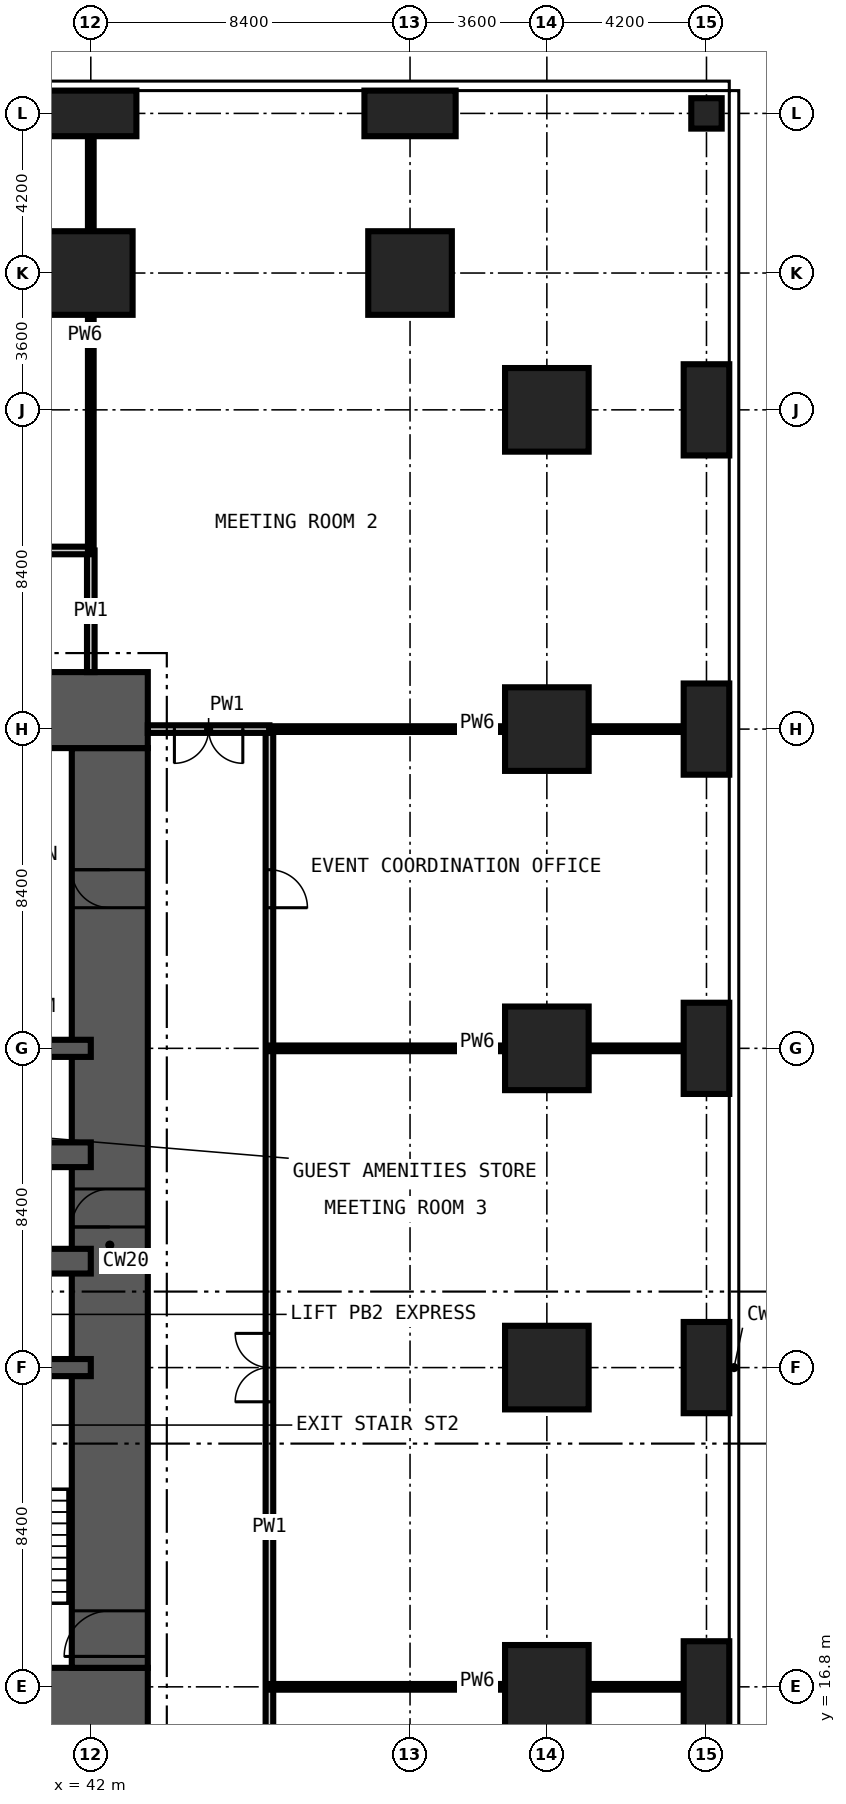
"""IFC4 building model, lengths in metres.
Left out: names, types, materials, properties, quantities, classifications, styles, units other than length and angle.
Written with IfcOpenShell. Run it as: python <this file> out.ifc"""

import sys

from ifc_helpers import new_model, si_unit, direction, frame, frame_2d, origin, origin_2d, place, context, subcontext, project, spatial, rectangle, extrude, element, fill, save


model = new_model("IFC4")
c1 = context("Model", 3, precision=1e-05, world=origin(), true_north=direction((0.0, 1.0)))
c2 = subcontext(c1, "Body", "Model", "MODEL_VIEW")
j1 = project(units=[si_unit("LENGTHUNIT", "METRE"), si_unit("PLANEANGLEUNIT", "RADIAN")], contexts=[c1])
p1 = place(None, origin())
s1 = spatial("IfcSite", under=j1, at=p1, CompositionType="ELEMENT")
p2 = place(p1, origin())
s2 = spatial("IfcBuilding", under=s1, at=p2, CompositionType="ELEMENT")
p3 = place(p2, frame((0.0, 0.0, 6.0)))
s3 = spatial("IfcBuildingStorey", under=s2, at=p3, CompositionType="ELEMENT", Elevation=6.0)
p4 = place(p3, frame((42.0, 54.0, -0.3), z_axis=(0.0, 0.0, 1.0), x_axis=(1.0, 0.0, 0.0)))
e1 = element("IfcColumn", 1, at=p4, inside=s3, PredefinedType="COLUMN", context=c2, shape_type="SweptSolid", body=[
    extrude(rectangle(XDim=2.2, YDim=2.2, at=origin_2d()), origin(), (0.0, 0.0, 1.0), 6.0),
])
p5 = place(p3, frame((42.0, 58.2, -0.3), z_axis=(0.0, 0.0, 1.0), x_axis=(1.0, 0.0, 0.0)))
e2 = element("IfcColumn", 2, at=p5, inside=s3, PredefinedType="COLUMN", context=c2, shape_type="SweptSolid", body=[
    extrude(rectangle(XDim=2.4, YDim=1.2, at=origin_2d()), origin(), (0.0, 0.0, 1.0), 6.0),
])
p6 = place(p3, frame((50.4, 54.0, -0.3), z_axis=(0.0, 0.0, 1.0), x_axis=(1.0, 0.0, 0.0)))
e3 = element("IfcColumn", 3, at=p6, inside=s3, PredefinedType="COLUMN", context=c2, shape_type="SweptSolid", body=[
    extrude(rectangle(XDim=2.2, YDim=2.2, at=origin_2d()), origin(), (0.0, 0.0, 1.0), 6.0),
])
p7 = place(p3, frame((50.4, 58.2, -0.3), z_axis=(0.0, 0.0, 1.0), x_axis=(1.0, 0.0, 0.0)))
e4 = element("IfcColumn", 4, at=p7, inside=s3, PredefinedType="COLUMN", context=c2, shape_type="SweptSolid", body=[
    extrude(rectangle(XDim=2.4, YDim=1.2, at=origin_2d()), origin(), (0.0, 0.0, 1.0), 6.0),
])
for number, where, z_axis, x_axis in (
    (5, (54.0, 16.8, -0.3), (0.0, 0.0, 1.0), (1.0, 0.0, 0.0)),
    (6, (54.0, 25.2, -0.3), (0.0, 0.0, 1.0), (1.0, 0.0, 0.0)),
    (7, (54.0, 33.6, -0.3), (0.0, 0.0, 1.0), (1.0, 0.0, 0.0)),
    (8, (54.0, 42.0, -0.3), (0.0, 0.0, 1.0), (1.0, 0.0, 0.0)),
    (9, (54.0, 50.4, -0.3), (0.0, 0.0, 1.0), (1.0, 0.0, 0.0)),
):
    element("IfcColumn", number, at=place(p3, frame(where, z_axis=z_axis, x_axis=x_axis)), inside=s3, PredefinedType="COLUMN", context=c2, shape_type="SweptSolid", body=[
        extrude(rectangle(XDim=2.2, YDim=2.2, at=origin_2d()), origin(), (0.0, 0.0, 1.0), 6.0),
    ])
for number, where, z_axis, x_axis in (
    (10, (58.2, 16.8, -0.3), (0.0, 0.0, 1.0), (1.0, 0.0, 0.0)),
    (11, (58.2, 25.2, -0.3), (0.0, 0.0, 1.0), (1.0, 0.0, 0.0)),
    (12, (58.2, 33.6, -0.3), (0.0, 0.0, 1.0), (1.0, 0.0, 0.0)),
    (13, (58.2, 42.0, -0.3), (0.0, 0.0, 1.0), (1.0, 0.0, 0.0)),
    (14, (58.2, 50.4, -0.3), (0.0, 0.0, 1.0), (1.0, 0.0, 0.0)),
):
    element("IfcColumn", number, at=place(p3, frame(where, z_axis=z_axis, x_axis=x_axis)), inside=s3, PredefinedType="COLUMN", context=c2, shape_type="SweptSolid", body=[
        extrude(rectangle(XDim=1.2, YDim=2.4, at=origin_2d()), origin(), (0.0, 0.0, 1.0), 6.0),
    ])
p8 = place(p3, frame((58.2, 58.2, -0.3), z_axis=(0.0, 0.0, 1.0), x_axis=(1.0, 0.0, 0.0)))
e15 = element("IfcColumn", 15, at=p8, inside=s3, PredefinedType="COLUMN", context=c2, shape_type="SweptSolid", body=[
    extrude(rectangle(XDim=0.8, YDim=0.8, at=origin_2d()), origin(), (0.0, 0.0, 1.0), 6.0),
])
p9 = place(p3, frame((15.3, 16.3, -0.3), z_axis=(0.0, 0.0, 1.0), x_axis=(1.0, 0.0, 0.0)))
e16 = element("IfcWall", 16, at=p9, inside=s3, PredefinedType="SHEAR", context=c2, shape_type="SweptSolid", body=[
    extrude(rectangle(XDim=28.2, YDim=2.0, at=frame_2d((14.1, 0.0))), origin(), (0.0, 0.0, 1.0), 6.0),
])
p10 = place(p9, frame((13.6, 0.0, 0.3)))
e17 = element("IfcOpeningElement", 17, at=p10, cuts=e16, PredefinedType="OPENING", context=c2, shape_type="SweptSolid", body=[
    extrude(rectangle(XDim=1.0, YDim=2.1, at=frame_2d((0.5, 1.05))), frame((0.0, 1.01, 0.0), z_axis=(0.0, -1.0, 0.0), x_axis=(1.0, 0.0, 0.0)), (0.0, 0.0, 1.0), 2.02),
])
p11 = place(p9, frame((19.9, 0.0, 0.3)))
e18 = element("IfcOpeningElement", 18, at=p11, cuts=e16, PredefinedType="OPENING", context=c2, shape_type="SweptSolid", body=[
    extrude(rectangle(XDim=1.0, YDim=2.1, at=frame_2d((0.5, 1.05))), frame((0.0, 1.01, 0.0), z_axis=(0.0, -1.0, 0.0), x_axis=(1.0, 0.0, 0.0)), (0.0, 0.0, 1.0), 2.02),
])
p12 = place(p3, frame((42.5, 17.3, -0.3), z_axis=(0.0, 0.0, 1.0), x_axis=(0.0, 1.0, 0.0)))
e19 = element("IfcWall", 19, at=p12, inside=s3, PredefinedType="SHEAR", context=c2, shape_type="SweptSolid", body=[
    extrude(rectangle(XDim=24.2, YDim=2.0, at=frame_2d((12.1, 0.0))), origin(), (0.0, 0.0, 1.0), 6.0),
])
p13 = place(p12, frame((0.3, 0.0, 0.3)))
e20 = element("IfcOpeningElement", 20, at=p13, cuts=e19, PredefinedType="OPENING", context=c2, shape_type="SweptSolid", body=[
    extrude(rectangle(XDim=1.2, YDim=2.2, at=frame_2d((0.6, 1.1))), frame((0.0, 1.01, 0.0), z_axis=(0.0, -1.0, 0.0), x_axis=(1.0, 0.0, 0.0)), (0.0, 0.0, 1.0), 2.02),
])
p14 = place(p12, frame((11.6, 0.0, 0.3)))
e21 = element("IfcOpeningElement", 21, at=p14, cuts=e19, PredefinedType="OPENING", context=c2, shape_type="SweptSolid", body=[
    extrude(rectangle(XDim=1.0, YDim=2.1, at=frame_2d((0.5, 1.05))), frame((0.0, 1.01, 0.0), z_axis=(0.0, -1.0, 0.0), x_axis=(1.0, 0.0, 0.0)), (0.0, 0.0, 1.0), 2.02),
])
p15 = place(p12, frame((20.0, 0.0, 0.3)))
e22 = element("IfcOpeningElement", 22, at=p15, cuts=e19, PredefinedType="OPENING", context=c2, shape_type="SweptSolid", body=[
    extrude(rectangle(XDim=1.0, YDim=2.1, at=frame_2d((0.5, 1.05))), frame((0.0, 1.01, 0.0), z_axis=(0.0, -1.0, 0.0), x_axis=(1.0, 0.0, 0.0)), (0.0, 0.0, 1.0), 2.02),
])
p16 = place(p3, frame((43.5, 42.5, -0.3), z_axis=(0.0, 0.0, 1.0), x_axis=(-1.0, 0.0, 0.0)))
e23 = element("IfcWall", 23, at=p16, inside=s3, PredefinedType="SHEAR", context=c2, shape_type="SweptSolid", body=[
    extrude(rectangle(XDim=28.2, YDim=2.0, at=frame_2d((14.1, 0.0))), origin(), (0.0, 0.0, 1.0), 6.0),
])
p17 = place(p16, frame((21.4, 0.0, 0.3)))
e24 = element("IfcOpeningElement", 24, at=p17, cuts=e23, PredefinedType="OPENING", context=c2, shape_type="SweptSolid", body=[
    extrude(rectangle(XDim=1.0, YDim=2.1, at=frame_2d((0.5, 1.05))), frame((0.0, 1.01, 0.0), z_axis=(0.0, -1.0, 0.0), x_axis=(1.0, 0.0, 0.0)), (0.0, 0.0, 1.0), 2.02),
])
p18 = place(p16, frame((11.4, 0.0, 0.3)))
e25 = element("IfcOpeningElement", 25, at=p18, cuts=e23, PredefinedType="OPENING", context=c2, shape_type="SweptSolid", body=[
    extrude(rectangle(XDim=1.2, YDim=2.2, at=frame_2d((0.6, 1.1))), frame((0.0, 1.01, 0.0), z_axis=(0.0, -1.0, 0.0), x_axis=(1.0, 0.0, 0.0)), (0.0, 0.0, 1.0), 2.02),
])
for number, where, z_axis, x_axis in (
    (26, (16.8, 25.2, -0.3), (0.0, 0.0, 1.0), (1.0, 0.0, 0.0)),
    (27, (16.8, 33.6, -0.3), (0.0, 0.0, 1.0), (1.0, 0.0, 0.0)),
):
    element("IfcWall", number, at=place(p3, frame(where, z_axis=z_axis, x_axis=x_axis)), inside=s3, PredefinedType="SHEAR", context=c2, shape_type="SweptSolid", body=[
        extrude(rectangle(XDim=25.2, YDim=0.45, at=frame_2d((12.6, 0.0))), origin(), (0.0, 0.0, 1.0), 6.0),
    ])
p19 = place(p3, frame((33.6, 28.0, -0.3), z_axis=(0.0, 0.0, 1.0), x_axis=(1.0, 0.0, 0.0)))
e28 = element("IfcWall", 28, at=p19, inside=s3, PredefinedType="SHEAR", context=c2, shape_type="SweptSolid", body=[
    extrude(rectangle(XDim=8.4, YDim=0.65, at=frame_2d((4.2, 0.0))), origin(), (0.0, 0.0, 1.0), 6.0),
])
p20 = place(p3, frame((33.6, 30.8, -0.3), z_axis=(0.0, 0.0, 1.0), x_axis=(1.0, 0.0, 0.0)))
e29 = element("IfcWall", 29, at=p20, inside=s3, PredefinedType="SHEAR", context=c2, shape_type="SweptSolid", body=[
    extrude(rectangle(XDim=8.4, YDim=0.65, at=frame_2d((4.2, 0.0))), origin(), (0.0, 0.0, 1.0), 6.0),
])
p21 = place(p20, frame((1.6, 0.0, 0.3)))
e30 = element("IfcOpeningElement", 30, at=p21, cuts=e29, PredefinedType="OPENING", context=c2, shape_type="SweptSolid", body=[
    extrude(rectangle(XDim=1.0, YDim=2.1, at=frame_2d((0.5, 1.05))), frame((0.0, 0.335, 0.0), z_axis=(0.0, -1.0, 0.0), x_axis=(1.0, 0.0, 0.0)), (0.0, 0.0, 1.0), 0.67),
])
p22 = place(p20, frame((4.6, 0.0, 0.3)))
e31 = element("IfcOpeningElement", 31, at=p22, cuts=e29, PredefinedType="OPENING", context=c2, shape_type="SweptSolid", body=[
    extrude(rectangle(XDim=1.0, YDim=2.1, at=frame_2d((0.5, 1.05))), frame((0.0, 0.335, 0.0), z_axis=(0.0, -1.0, 0.0), x_axis=(1.0, 0.0, 0.0)), (0.0, 0.0, 1.0), 0.67),
])
p23 = place(p3, frame((42.0, 43.5, 0.0), z_axis=(0.0, 0.0, 1.0), x_axis=(0.0, 1.0, 0.0)))
e32 = element("IfcWall", 32, at=p23, inside=s3, PredefinedType="PARTITIONING", context=c2, shape_type="SweptSolid", body=[
    extrude(rectangle(XDim=3.2, YDim=0.2, at=frame_2d((1.6, 0.0))), origin(), (0.0, 0.0, 1.0), 5.7),
])
p24 = place(p3, frame((46.7, 0.0, 0.0), z_axis=(0.0, 0.0, 1.0), x_axis=(0.0, 1.0, 0.0)))
e33 = element("IfcWall", 33, at=p24, inside=s3, PredefinedType="PARTITIONING", context=c2, shape_type="SweptSolid", body=[
    extrude(rectangle(XDim=42.0, YDim=0.2, at=frame_2d((21.0, 0.0))), origin(), (0.0, 0.0, 1.0), 5.7),
])
p25 = place(p24, frame((24.3, 0.0, 0.0)))
e34 = element("IfcOpeningElement", 34, at=p25, cuts=e33, PredefinedType="OPENING", context=c2, shape_type="SweptSolid", body=[
    extrude(rectangle(XDim=1.8, YDim=2.4, at=frame_2d((0.9, 1.2))), frame((0.0, 0.11, 0.0), z_axis=(0.0, -1.0, 0.0), x_axis=(1.0, 0.0, 0.0)), (0.0, 0.0, 1.0), 0.22),
])
p26 = place(p24, frame((7.9, 0.0, 0.0)))
e35 = element("IfcOpeningElement", 35, at=p26, cuts=e33, PredefinedType="OPENING", context=c2, shape_type="SweptSolid", body=[
    extrude(rectangle(XDim=1.0, YDim=2.1, at=frame_2d((0.5, 1.05))), frame((0.0, 0.11, 0.0), z_axis=(0.0, -1.0, 0.0), x_axis=(1.0, 0.0, 0.0)), (0.0, 0.0, 1.0), 0.22),
])
p27 = place(p24, frame((37.3, 0.0, 0.0)))
e36 = element("IfcOpeningElement", 36, at=p27, cuts=e33, PredefinedType="OPENING", context=c2, shape_type="SweptSolid", body=[
    extrude(rectangle(XDim=1.0, YDim=2.1, at=frame_2d((0.5, 1.05))), frame((0.0, 0.11, 0.0), z_axis=(0.0, -1.0, 0.0), x_axis=(1.0, 0.0, 0.0)), (0.0, 0.0, 1.0), 0.22),
])
p28 = place(p3, frame((33.6, 46.7, 0.0), z_axis=(0.0, 0.0, 1.0), x_axis=(1.0, 0.0, 0.0)))
e37 = element("IfcWall", 37, at=p28, inside=s3, PredefinedType="PARTITIONING", context=c2, shape_type="SweptSolid", body=[
    extrude(rectangle(XDim=8.4, YDim=0.2, at=frame_2d((4.2, 0.0))), origin(), (0.0, 0.0, 1.0), 5.7),
])
p29 = place(p28, frame((3.7, 0.0, 0.0)))
e38 = element("IfcOpeningElement", 38, at=p29, cuts=e37, PredefinedType="OPENING", context=c2, shape_type="SweptSolid", body=[
    extrude(rectangle(XDim=1.0, YDim=2.1, at=frame_2d((0.5, 1.05))), frame((0.0, 0.11, 0.0), z_axis=(0.0, -1.0, 0.0), x_axis=(1.0, 0.0, 0.0)), (0.0, 0.0, 1.0), 0.22),
])
p30 = place(p3, frame((46.7, 42.0, 0.0), z_axis=(0.0, 0.0, 1.0), x_axis=(-1.0, 0.0, 0.0)))
e39 = element("IfcWall", 39, at=p30, inside=s3, PredefinedType="PARTITIONING", context=c2, shape_type="SweptSolid", body=[
    extrude(rectangle(XDim=3.2, YDim=0.2, at=frame_2d((1.6, 0.0))), origin(), (0.0, 0.0, 1.0), 5.7),
])
p31 = place(p30, frame((0.7, 0.0, 0.0)))
e40 = element("IfcOpeningElement", 40, at=p31, cuts=e39, PredefinedType="OPENING", context=c2, shape_type="SweptSolid", body=[
    extrude(rectangle(XDim=1.8, YDim=2.4, at=frame_2d((0.9, 1.2))), frame((0.0, 0.11, 0.0), z_axis=(0.0, -1.0, 0.0), x_axis=(1.0, 0.0, 0.0)), (0.0, 0.0, 1.0), 0.22),
])
for number, where, z_axis, x_axis in (
    (41, (42.0, 46.7, 0.0), (0.0, 0.0, 1.0), (0.0, 1.0, 0.0)),
    (42, (46.7, 16.8, 0.0), (0.0, 0.0, 1.0), (1.0, 0.0, 0.0)),
    (43, (46.7, 33.6, 0.0), (0.0, 0.0, 1.0), (1.0, 0.0, 0.0)),
    (44, (46.7, 42.0, 0.0), (0.0, 0.0, 1.0), (1.0, 0.0, 0.0)),
):
    element("IfcWall", number, at=place(p3, frame(where, z_axis=z_axis, x_axis=x_axis)), inside=s3, PredefinedType="PARTITIONING", context=c2, shape_type="SweptSolid", body=[
        extrude(rectangle(XDim=12.1, YDim=0.15, at=frame_2d((6.05, 0.0))), origin(), (0.0, 0.0, 1.0), 5.7),
    ])
p32 = place(p13, origin())
e45 = element("IfcDoor", 45, at=p32, inside=s3, OperationType="SINGLE_SWING_LEFT", PredefinedType="DOOR", context=c2, shape_type="SweptSolid", body=[
    extrude(rectangle(XDim=1.2, YDim=2.2, at=frame_2d((0.6, 1.1))), frame((0.0, 0.025, 0.0), z_axis=(0.0, -1.0, 0.0), x_axis=(1.0, 0.0, 0.0)), (0.0, 0.0, 1.0), 0.05),
])
fill(e20, e45)
p33 = place(p14, origin())
e46 = element("IfcDoor", 46, at=p33, inside=s3, OperationType="SINGLE_SWING_LEFT", PredefinedType="DOOR", context=c2, shape_type="SweptSolid", body=[
    extrude(rectangle(XDim=1.0, YDim=2.1, at=frame_2d((0.5, 1.05))), frame((0.0, 0.025, 0.0), z_axis=(0.0, -1.0, 0.0), x_axis=(1.0, 0.0, 0.0)), (0.0, 0.0, 1.0), 0.05),
])
fill(e21, e46)
p34 = place(p15, origin())
e47 = element("IfcDoor", 47, at=p34, inside=s3, OperationType="SINGLE_SWING_RIGHT", PredefinedType="DOOR", context=c2, shape_type="SweptSolid", body=[
    extrude(rectangle(XDim=1.0, YDim=2.1, at=frame_2d((0.5, 1.05))), frame((0.0, 0.025, 0.0), z_axis=(0.0, -1.0, 0.0), x_axis=(1.0, 0.0, 0.0)), (0.0, 0.0, 1.0), 0.05),
])
fill(e22, e47)
p35 = place(p31, origin())
e48 = element("IfcDoor", 48, at=p35, inside=s3, OperationType="DOUBLE_DOOR_DOUBLE_SWING", PredefinedType="DOOR", context=c2, shape_type="SweptSolid", body=[
    extrude(rectangle(XDim=1.8, YDim=2.4, at=frame_2d((0.9, 1.2))), frame((0.0, 0.025, 0.0), z_axis=(0.0, -1.0, 0.0), x_axis=(1.0, 0.0, 0.0)), (0.0, 0.0, 1.0), 0.05),
])
fill(e40, e48)
p36 = place(p25, origin())
e49 = element("IfcDoor", 49, at=p36, inside=s3, OperationType="DOUBLE_DOOR_DOUBLE_SWING", PredefinedType="DOOR", context=c2, shape_type="SweptSolid", body=[
    extrude(rectangle(XDim=1.8, YDim=2.4, at=frame_2d((0.9, 1.2))), frame((0.0, 0.025, 0.0), z_axis=(0.0, -1.0, 0.0), x_axis=(1.0, 0.0, 0.0)), (0.0, 0.0, 1.0), 0.05),
])
fill(e34, e49)
p37 = place(p27, frame((1.0, 0.0, 0.0), z_axis=(0.0, 0.0, 1.0), x_axis=(-1.0, 0.0, 0.0)))
e50 = element("IfcDoor", 50, at=p37, inside=s3, OperationType="SINGLE_SWING_RIGHT", PredefinedType="DOOR", context=c2, shape_type="SweptSolid", body=[
    extrude(rectangle(XDim=1.0, YDim=2.1, at=frame_2d((0.5, 1.05))), frame((0.0, 0.025, 0.0), z_axis=(0.0, -1.0, 0.0), x_axis=(1.0, 0.0, 0.0)), (0.0, 0.0, 1.0), 0.05),
])
fill(e36, e50)
save(model, sys.argv[1])
